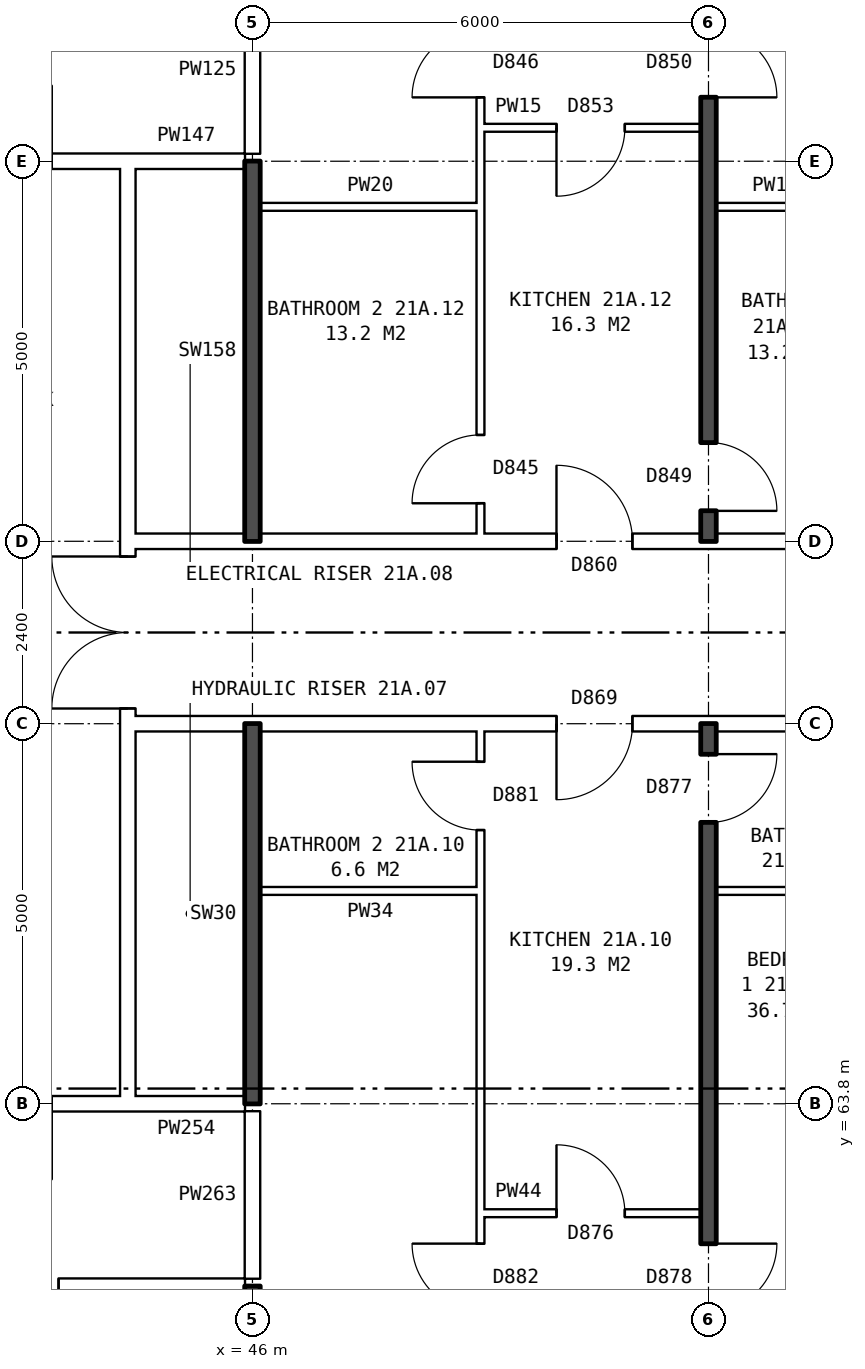
"""IFC4 building model, lengths in metres.
Left out: names, types, materials, properties, quantities, classifications, styles, units other than length and angle.
Written with IfcOpenShell. Run it as: python <this file> out.ifc"""

import sys

from ifc_helpers import new_model, si_unit, direction, frame, frame_2d, origin, place, context, subcontext, project, spatial, rectangle, extrude, element, fill, save


model = new_model("IFC4")
c1 = context("Model", 3, precision=1e-05, world=origin(), true_north=direction((0.0, 1.0)))
c2 = subcontext(c1, "Body", "Model", "MODEL_VIEW")
j1 = project(units=[si_unit("LENGTHUNIT", "METRE"), si_unit("PLANEANGLEUNIT", "RADIAN")], contexts=[c1])
p1 = place(None, origin())
s1 = spatial("IfcSite", under=j1, at=p1, CompositionType="ELEMENT")
p2 = place(p1, origin())
s2 = spatial("IfcBuilding", under=s1, at=p2, CompositionType="ELEMENT")
p3 = place(p2, frame((0.0, 0.0, 77.8)))
s3 = spatial("IfcBuildingStorey", under=s2, at=p3, CompositionType="ELEMENT", Elevation=77.8)
p4 = place(p3, frame((44.36, 63.9, 0.0), z_axis=(0.0, 0.0, 1.0), x_axis=(0.0, 1.0, 0.0)))
e1 = element("IfcWall", 1, at=p4, inside=s3, PredefinedType="PARTITIONING", context=c2, shape_type="SweptSolid", body=[
    extrude(rectangle(XDim=12.2, YDim=0.2, at=frame_2d((6.1, 0.0))), origin(), (0.0, 0.0, 1.0), 2.85),
])
p5 = place(p4, frame((5.1, 0.0, 0.0)))
e2 = element("IfcOpeningElement", 2, at=p5, cuts=e1, PredefinedType="OPENING", context=c2, shape_type="SweptSolid", body=[
    extrude(rectangle(XDim=2.0, YDim=2.1, at=frame_2d((1.0, 1.05))), frame((0.0, 0.11, 0.0), z_axis=(0.0, -1.0, 0.0), x_axis=(1.0, 0.0, 0.0)), (0.0, 0.0, 1.0), 0.22),
])
p6 = place(p3, frame((23.61, 61.4, 0.0), z_axis=(0.0, 0.0, 1.0), x_axis=(1.0, 0.0, 0.0)))
e3 = element("IfcWall", 3, at=p6, inside=s3, PredefinedType="PARTITIONING", context=c2, shape_type="SweptSolid", body=[
    extrude(rectangle(XDim=22.29, YDim=0.2, at=frame_2d((11.145, 0.0))), origin(), (0.0, 0.0, 1.0), 2.85),
])
p7 = place(p6, frame((18.84, 0.0, 0.0)))
e4 = element("IfcOpeningElement", 4, at=p7, cuts=e3, PredefinedType="OPENING", context=c2, shape_type="SweptSolid", body=[
    extrude(rectangle(XDim=1.0, YDim=2.1, at=frame_2d((0.5, 1.05))), frame((0.0, 0.11, 0.0), z_axis=(0.0, -1.0, 0.0), x_axis=(1.0, 0.0, 0.0)), (0.0, 0.0, 1.0), 0.22),
])
p8 = place(p6, frame((6.89, 0.0, 0.0)))
e5 = element("IfcOpeningElement", 5, at=p8, cuts=e3, PredefinedType="OPENING", context=c2, shape_type="SweptSolid", body=[
    extrude(rectangle(XDim=1.0, YDim=2.1, at=frame_2d((0.5, 1.05))), frame((0.0, 0.11, 0.0), z_axis=(0.0, -1.0, 0.0), x_axis=(1.0, 0.0, 0.0)), (0.0, 0.0, 1.0), 0.22),
])
p9 = place(p3, frame((49.0, 62.36, 0.0), z_axis=(0.0, 0.0, 1.0), x_axis=(1.0, 0.0, 0.0)))
e6 = element("IfcWall", 6, at=p9, inside=s3, PredefinedType="PARTITIONING", context=c2, shape_type="SweptSolid", body=[
    extrude(rectangle(XDim=2.9, YDim=0.1, at=frame_2d((1.45, 0.0))), origin(), (0.0, 0.0, 1.0), 2.85),
])
p10 = place(p9, frame((1.0, 0.0, 0.0)))
e7 = element("IfcOpeningElement", 7, at=p10, cuts=e6, PredefinedType="OPENING", context=c2, shape_type="SweptSolid", body=[
    extrude(rectangle(XDim=0.9, YDim=2.1, at=frame_2d((0.45, 1.05))), frame((0.0, 0.06, 0.0), z_axis=(0.0, -1.0, 0.0), x_axis=(1.0, 0.0, 0.0)), (0.0, 0.0, 1.0), 0.12),
])
p11 = place(p3, frame((41.36, 63.8, 0.0), z_axis=(0.0, 0.0, 1.0), x_axis=(1.0, 0.0, 0.0)))
e8 = element("IfcWall", 8, at=p11, inside=s3, PredefinedType="PARTITIONING", context=c2, shape_type="SweptSolid", body=[
    extrude(rectangle(XDim=3.0, YDim=0.2, at=frame_2d((1.5, 0.0))), origin(), (0.0, 0.0, 1.0), 2.85),
])
p12 = place(p11, frame((1.0, 0.0, 0.0)))
e9 = element("IfcOpeningElement", 9, at=p12, cuts=e8, PredefinedType="OPENING", context=c2, shape_type="SweptSolid", body=[
    extrude(rectangle(XDim=1.0, YDim=2.1, at=frame_2d((0.5, 1.05))), frame((0.0, 0.11, 0.0), z_axis=(0.0, -1.0, 0.0), x_axis=(1.0, 0.0, 0.0)), (0.0, 0.0, 1.0), 0.22),
])
p13 = place(p3, frame((44.36, 63.8, 0.0), z_axis=(0.0, 0.0, 1.0), x_axis=(1.0, 0.0, 0.0)))
e10 = element("IfcWall", 10, at=p13, inside=s3, PredefinedType="PARTITIONING", context=c2, shape_type="SweptSolid", body=[
    extrude(rectangle(XDim=1.54, YDim=0.2, at=frame_2d((0.77, 0.0))), origin(), (0.0, 0.0, 1.0), 2.85),
])
p14 = place(p3, frame((46.1, 66.6, 0.0), z_axis=(0.0, 0.0, 1.0), x_axis=(1.0, 0.0, 0.0)))
e11 = element("IfcWall", 11, at=p14, inside=s3, PredefinedType="PARTITIONING", context=c2, shape_type="SweptSolid", body=[
    extrude(rectangle(XDim=2.9, YDim=0.1, at=frame_2d((1.45, 0.0))), origin(), (0.0, 0.0, 1.0), 2.85),
])
p15 = place(p3, frame((52.1, 66.6, 0.0), z_axis=(0.0, 0.0, 1.0), x_axis=(1.0, 0.0, 0.0)))
e12 = element("IfcWall", 12, at=p15, inside=s3, PredefinedType="PARTITIONING", context=c2, shape_type="SweptSolid", body=[
    extrude(rectangle(XDim=2.8, YDim=0.1, at=frame_2d((1.4, 0.0))), origin(), (0.0, 0.0, 1.0), 2.85),
])
p16 = place(p3, frame((44.36, 68.8, 0.0), z_axis=(0.0, 0.0, 1.0), x_axis=(1.0, 0.0, 0.0)))
e13 = element("IfcWall", 13, at=p16, inside=s3, PredefinedType="PARTITIONING", context=c2, shape_type="SweptSolid", body=[
    extrude(rectangle(XDim=19.28, YDim=0.2, at=frame_2d((9.64, 0.0))), origin(), (0.0, 0.0, 1.0), 2.85),
])
p17 = place(p16, frame((14.64, 0.0, 0.0)))
e14 = element("IfcOpeningElement", 14, at=p17, cuts=e13, PredefinedType="OPENING", context=c2, shape_type="SweptSolid", body=[
    extrude(rectangle(XDim=1.0, YDim=2.1, at=frame_2d((0.5, 1.05))), frame((0.0, 0.11, 0.0), z_axis=(0.0, -1.0, 0.0), x_axis=(1.0, 0.0, 0.0)), (0.0, 0.0, 1.0), 0.22),
])
p18 = place(p16, frame((5.64, 0.0, 0.0)))
e15 = element("IfcOpeningElement", 15, at=p18, cuts=e13, PredefinedType="OPENING", context=c2, shape_type="SweptSolid", body=[
    extrude(rectangle(XDim=1.0, YDim=2.1, at=frame_2d((0.5, 1.05))), frame((0.0, 0.11, 0.0), z_axis=(0.0, -1.0, 0.0), x_axis=(1.0, 0.0, 0.0)), (0.0, 0.0, 1.0), 0.22),
])
p19 = place(p3, frame((44.36, 71.2, 0.0), z_axis=(0.0, 0.0, 1.0), x_axis=(1.0, 0.0, 0.0)))
e16 = element("IfcWall", 16, at=p19, inside=s3, PredefinedType="PARTITIONING", context=c2, shape_type="SweptSolid", body=[
    extrude(rectangle(XDim=19.28, YDim=0.2, at=frame_2d((9.64, 0.0))), origin(), (0.0, 0.0, 1.0), 2.85),
])
p20 = place(p19, frame((14.64, 0.0, 0.0)))
e17 = element("IfcOpeningElement", 17, at=p20, cuts=e16, PredefinedType="OPENING", context=c2, shape_type="SweptSolid", body=[
    extrude(rectangle(XDim=1.0, YDim=2.1, at=frame_2d((0.5, 1.05))), frame((0.0, 0.11, 0.0), z_axis=(0.0, -1.0, 0.0), x_axis=(1.0, 0.0, 0.0)), (0.0, 0.0, 1.0), 0.22),
])
p21 = place(p19, frame((5.64, 0.0, 0.0)))
e18 = element("IfcOpeningElement", 18, at=p21, cuts=e16, PredefinedType="OPENING", context=c2, shape_type="SweptSolid", body=[
    extrude(rectangle(XDim=1.0, YDim=2.1, at=frame_2d((0.5, 1.05))), frame((0.0, 0.11, 0.0), z_axis=(0.0, -1.0, 0.0), x_axis=(1.0, 0.0, 0.0)), (0.0, 0.0, 1.0), 0.22),
])
p22 = place(p3, frame((46.1, 75.6, 0.0), z_axis=(0.0, 0.0, 1.0), x_axis=(1.0, 0.0, 0.0)))
e19 = element("IfcWall", 19, at=p22, inside=s3, PredefinedType="PARTITIONING", context=c2, shape_type="SweptSolid", body=[
    extrude(rectangle(XDim=2.9, YDim=0.1, at=frame_2d((1.45, 0.0))), origin(), (0.0, 0.0, 1.0), 2.85),
])
p23 = place(p3, frame((52.1, 75.6, 0.0), z_axis=(0.0, 0.0, 1.0), x_axis=(1.0, 0.0, 0.0)))
e20 = element("IfcWall", 20, at=p23, inside=s3, PredefinedType="PARTITIONING", context=c2, shape_type="SweptSolid", body=[
    extrude(rectangle(XDim=2.8, YDim=0.1, at=frame_2d((1.4, 0.0))), origin(), (0.0, 0.0, 1.0), 2.85),
])
p24 = place(p3, frame((41.36, 76.2, 0.0), z_axis=(0.0, 0.0, 1.0), x_axis=(1.0, 0.0, 0.0)))
e21 = element("IfcWall", 21, at=p24, inside=s3, PredefinedType="PARTITIONING", context=c2, shape_type="SweptSolid", body=[
    extrude(rectangle(XDim=3.0, YDim=0.2, at=frame_2d((1.5, 0.0))), origin(), (0.0, 0.0, 1.0), 2.85),
])
p25 = place(p24, frame((1.0, 0.0, 0.0)))
e22 = element("IfcOpeningElement", 22, at=p25, cuts=e21, PredefinedType="OPENING", context=c2, shape_type="SweptSolid", body=[
    extrude(rectangle(XDim=1.0, YDim=2.1, at=frame_2d((0.5, 1.05))), frame((0.0, 0.11, 0.0), z_axis=(0.0, -1.0, 0.0), x_axis=(1.0, 0.0, 0.0)), (0.0, 0.0, 1.0), 0.22),
])
p26 = place(p3, frame((44.36, 76.2, 0.0), z_axis=(0.0, 0.0, 1.0), x_axis=(1.0, 0.0, 0.0)))
e23 = element("IfcWall", 23, at=p26, inside=s3, PredefinedType="PARTITIONING", context=c2, shape_type="SweptSolid", body=[
    extrude(rectangle(XDim=1.54, YDim=0.2, at=frame_2d((0.77, 0.0))), origin(), (0.0, 0.0, 1.0), 2.85),
])
p27 = place(p3, frame((49.0, 76.64, 0.0), z_axis=(0.0, 0.0, 1.0), x_axis=(1.0, 0.0, 0.0)))
e24 = element("IfcWall", 24, at=p27, inside=s3, PredefinedType="PARTITIONING", context=c2, shape_type="SweptSolid", body=[
    extrude(rectangle(XDim=2.9, YDim=0.1, at=frame_2d((1.45, 0.0))), origin(), (0.0, 0.0, 1.0), 2.85),
])
p28 = place(p27, frame((1.0, 0.0, 0.0)))
e25 = element("IfcOpeningElement", 25, at=p28, cuts=e24, PredefinedType="OPENING", context=c2, shape_type="SweptSolid", body=[
    extrude(rectangle(XDim=0.9, YDim=2.1, at=frame_2d((0.45, 1.05))), frame((0.0, 0.06, 0.0), z_axis=(0.0, -1.0, 0.0), x_axis=(1.0, 0.0, 0.0)), (0.0, 0.0, 1.0), 0.12),
])
p29 = place(p3, frame((46.0, 54.36, 0.0), z_axis=(0.0, 0.0, 1.0), x_axis=(0.0, 1.0, 0.0)))
e26 = element("IfcWall", 26, at=p29, inside=s3, PredefinedType="SOLIDWALL", context=c2, shape_type="SweptSolid", body=[
    extrude(rectangle(XDim=7.04, YDim=0.2, at=frame_2d((3.52, 0.0))), origin(), (0.0, 0.0, 1.0), 2.85),
])
p30 = place(p3, frame((46.0, 61.5, 0.0), z_axis=(0.0, 0.0, 1.0), x_axis=(0.0, 1.0, 0.0)))
e27 = element("IfcWall", 27, at=p30, inside=s3, PredefinedType="PARTITIONING", context=c2, shape_type="SweptSolid", body=[
    extrude(rectangle(XDim=2.2, YDim=0.2, at=frame_2d((1.1, 0.0))), origin(), (0.0, 0.0, 1.0), 2.85),
])
for number, where, z_axis, x_axis in (
    (28, (46.0, 63.8, 0.0), (0.0, 0.0, 1.0), (0.0, 1.0, 0.0)),
    (29, (46.0, 71.2, 0.0), (0.0, 0.0, 1.0), (0.0, 1.0, 0.0)),
):
    element("IfcWall", number, at=place(p3, frame(where, z_axis=z_axis, x_axis=x_axis)), inside=s3, PredefinedType="SOLIDWALL", context=c2, shape_type="SweptSolid", body=[
        extrude(rectangle(XDim=5.0, YDim=0.2, at=frame_2d((2.5, 0.0))), origin(), (0.0, 0.0, 1.0), 2.85),
    ])
p31 = place(p3, frame((46.0, 76.3, 0.0), z_axis=(0.0, 0.0, 1.0), x_axis=(0.0, 1.0, 0.0)))
e30 = element("IfcWall", 30, at=p31, inside=s3, PredefinedType="PARTITIONING", context=c2, shape_type="SweptSolid", body=[
    extrude(rectangle(XDim=2.2, YDim=0.2, at=frame_2d((1.1, 0.0))), origin(), (0.0, 0.0, 1.0), 2.85),
])
p32 = place(p3, frame((49.0, 54.36, 0.0), z_axis=(0.0, 0.0, 1.0), x_axis=(0.0, 1.0, 0.0)))
e31 = element("IfcWall", 31, at=p32, inside=s3, PredefinedType="PARTITIONING", context=c2, shape_type="SweptSolid", body=[
    extrude(rectangle(XDim=14.34, YDim=0.1, at=frame_2d((7.17, 0.0))), origin(), (0.0, 0.0, 1.0), 2.85),
])
p33 = place(p32, frame((6.7, 0.0, 0.0)))
e32 = element("IfcOpeningElement", 32, at=p33, cuts=e31, PredefinedType="OPENING", context=c2, shape_type="SweptSolid", body=[
    extrude(rectangle(XDim=0.9, YDim=2.1, at=frame_2d((0.45, 1.05))), frame((0.0, 0.06, 0.0), z_axis=(0.0, -1.0, 0.0), x_axis=(1.0, 0.0, 0.0)), (0.0, 0.0, 1.0), 0.12),
])
p34 = place(p32, frame((13.04, 0.0, 0.0)))
e33 = element("IfcOpeningElement", 33, at=p34, cuts=e31, PredefinedType="OPENING", context=c2, shape_type="SweptSolid", body=[
    extrude(rectangle(XDim=0.9, YDim=2.1, at=frame_2d((0.45, 1.05))), frame((0.0, 0.06, 0.0), z_axis=(0.0, -1.0, 0.0), x_axis=(1.0, 0.0, 0.0)), (0.0, 0.0, 1.0), 0.12),
])
p35 = place(p3, frame((49.0, 71.3, 0.0), z_axis=(0.0, 0.0, 1.0), x_axis=(0.0, 1.0, 0.0)))
e34 = element("IfcWall", 34, at=p35, inside=s3, PredefinedType="PARTITIONING", context=c2, shape_type="SweptSolid", body=[
    extrude(rectangle(XDim=14.34, YDim=0.1, at=frame_2d((7.17, 0.0))), origin(), (0.0, 0.0, 1.0), 2.85),
])
p36 = place(p35, frame((5.74, 0.0, 0.0)))
e35 = element("IfcOpeningElement", 35, at=p36, cuts=e34, PredefinedType="OPENING", context=c2, shape_type="SweptSolid", body=[
    extrude(rectangle(XDim=0.9, YDim=2.1, at=frame_2d((0.45, 1.05))), frame((0.0, 0.06, 0.0), z_axis=(0.0, -1.0, 0.0), x_axis=(1.0, 0.0, 0.0)), (0.0, 0.0, 1.0), 0.12),
])
p37 = place(p35, frame((0.4, 0.0, 0.0)))
e36 = element("IfcOpeningElement", 36, at=p37, cuts=e34, PredefinedType="OPENING", context=c2, shape_type="SweptSolid", body=[
    extrude(rectangle(XDim=0.9, YDim=2.1, at=frame_2d((0.45, 1.05))), frame((0.0, 0.06, 0.0), z_axis=(0.0, -1.0, 0.0), x_axis=(1.0, 0.0, 0.0)), (0.0, 0.0, 1.0), 0.12),
])
p38 = place(p3, frame((52.0, 54.36, 0.0), z_axis=(0.0, 0.0, 1.0), x_axis=(0.0, 1.0, 0.0)))
e37 = element("IfcWall", 37, at=p38, inside=s3, PredefinedType="SOLIDWALL", context=c2, shape_type="SweptSolid", body=[
    extrude(rectangle(XDim=14.44, YDim=0.2, at=frame_2d((7.22, 0.0))), origin(), (0.0, 0.0, 1.0), 2.85),
])
p39 = place(p38, frame((6.7, 0.0, 0.0)))
e38 = element("IfcOpeningElement", 38, at=p39, cuts=e37, PredefinedType="OPENING", context=c2, shape_type="SweptSolid", body=[
    extrude(rectangle(XDim=0.9, YDim=2.1, at=frame_2d((0.45, 1.05))), frame((0.0, 0.11, 0.0), z_axis=(0.0, -1.0, 0.0), x_axis=(1.0, 0.0, 0.0)), (0.0, 0.0, 1.0), 0.22),
])
p40 = place(p38, frame((13.14, 0.0, 0.0)))
e39 = element("IfcOpeningElement", 39, at=p40, cuts=e37, PredefinedType="OPENING", context=c2, shape_type="SweptSolid", body=[
    extrude(rectangle(XDim=0.9, YDim=2.1, at=frame_2d((0.45, 1.05))), frame((0.0, 0.11, 0.0), z_axis=(0.0, -1.0, 0.0), x_axis=(1.0, 0.0, 0.0)), (0.0, 0.0, 1.0), 0.22),
])
p41 = place(p3, frame((52.0, 71.2, 0.0), z_axis=(0.0, 0.0, 1.0), x_axis=(0.0, 1.0, 0.0)))
e40 = element("IfcWall", 40, at=p41, inside=s3, PredefinedType="SOLIDWALL", context=c2, shape_type="SweptSolid", body=[
    extrude(rectangle(XDim=14.44, YDim=0.2, at=frame_2d((7.22, 0.0))), origin(), (0.0, 0.0, 1.0), 2.85),
])
p42 = place(p41, frame((5.84, 0.0, 0.0)))
e41 = element("IfcOpeningElement", 41, at=p42, cuts=e40, PredefinedType="OPENING", context=c2, shape_type="SweptSolid", body=[
    extrude(rectangle(XDim=0.9, YDim=2.1, at=frame_2d((0.45, 1.05))), frame((0.0, 0.11, 0.0), z_axis=(0.0, -1.0, 0.0), x_axis=(1.0, 0.0, 0.0)), (0.0, 0.0, 1.0), 0.22),
])
p43 = place(p41, frame((0.4, 0.0, 0.0)))
e42 = element("IfcOpeningElement", 42, at=p43, cuts=e40, PredefinedType="OPENING", context=c2, shape_type="SweptSolid", body=[
    extrude(rectangle(XDim=0.9, YDim=2.1, at=frame_2d((0.45, 1.05))), frame((0.0, 0.11, 0.0), z_axis=(0.0, -1.0, 0.0), x_axis=(1.0, 0.0, 0.0)), (0.0, 0.0, 1.0), 0.22),
])
p44 = place(p5, origin())
e43 = element("IfcDoor", 43, at=p44, inside=s3, OperationType="DOUBLE_DOOR_SINGLE_SWING", PredefinedType="DOOR", context=c2, shape_type="SweptSolid", body=[
    extrude(rectangle(XDim=2.0, YDim=2.1, at=frame_2d((1.0, 1.05))), frame((0.0, 0.025, 0.0), z_axis=(0.0, -1.0, 0.0), x_axis=(1.0, 0.0, 0.0)), (0.0, 0.0, 1.0), 0.05),
])
fill(e2, e43)
p45 = place(p39, frame((0.9, 0.0, 0.0), z_axis=(0.0, 0.0, 1.0), x_axis=(-1.0, 0.0, 0.0)))
e44 = element("IfcDoor", 44, at=p45, inside=s3, OperationType="SINGLE_SWING_LEFT", PredefinedType="DOOR", context=c2, shape_type="SweptSolid", body=[
    extrude(rectangle(XDim=0.9, YDim=2.1, at=frame_2d((0.45, 1.05))), frame((0.0, 0.025, 0.0), z_axis=(0.0, -1.0, 0.0), x_axis=(1.0, 0.0, 0.0)), (0.0, 0.0, 1.0), 0.05),
])
fill(e38, e44)
p46 = place(p33, origin())
e45 = element("IfcDoor", 45, at=p46, inside=s3, OperationType="SINGLE_SWING_RIGHT", PredefinedType="DOOR", context=c2, shape_type="SweptSolid", body=[
    extrude(rectangle(XDim=0.9, YDim=2.1, at=frame_2d((0.45, 1.05))), frame((0.0, 0.025, 0.0), z_axis=(0.0, -1.0, 0.0), x_axis=(1.0, 0.0, 0.0)), (0.0, 0.0, 1.0), 0.05),
])
fill(e32, e45)
p47 = place(p18, frame((1.0, 0.0, 0.0), z_axis=(0.0, 0.0, 1.0), x_axis=(-1.0, 0.0, 0.0)))
e46 = element("IfcDoor", 46, at=p47, inside=s3, OperationType="SINGLE_SWING_RIGHT", PredefinedType="DOOR", context=c2, shape_type="SweptSolid", body=[
    extrude(rectangle(XDim=1.0, YDim=2.1, at=frame_2d((0.5, 1.05))), frame((0.0, 0.025, 0.0), z_axis=(0.0, -1.0, 0.0), x_axis=(1.0, 0.0, 0.0)), (0.0, 0.0, 1.0), 0.05),
])
fill(e15, e46)
p48 = place(p10, origin())
e47 = element("IfcDoor", 47, at=p48, inside=s3, OperationType="SINGLE_SWING_LEFT", PredefinedType="DOOR", context=c2, shape_type="SweptSolid", body=[
    extrude(rectangle(XDim=0.9, YDim=2.1, at=frame_2d((0.45, 1.05))), frame((0.0, 0.025, 0.0), z_axis=(0.0, -1.0, 0.0), x_axis=(1.0, 0.0, 0.0)), (0.0, 0.0, 1.0), 0.05),
])
fill(e7, e47)
p49 = place(p40, frame((0.9, 0.0, 0.0), z_axis=(0.0, 0.0, 1.0), x_axis=(-1.0, 0.0, 0.0)))
e48 = element("IfcDoor", 48, at=p49, inside=s3, OperationType="SINGLE_SWING_LEFT", PredefinedType="DOOR", context=c2, shape_type="SweptSolid", body=[
    extrude(rectangle(XDim=0.9, YDim=2.1, at=frame_2d((0.45, 1.05))), frame((0.0, 0.025, 0.0), z_axis=(0.0, -1.0, 0.0), x_axis=(1.0, 0.0, 0.0)), (0.0, 0.0, 1.0), 0.05),
])
fill(e39, e48)
p50 = place(p34, origin())
e49 = element("IfcDoor", 49, at=p50, inside=s3, OperationType="SINGLE_SWING_RIGHT", PredefinedType="DOOR", context=c2, shape_type="SweptSolid", body=[
    extrude(rectangle(XDim=0.9, YDim=2.1, at=frame_2d((0.45, 1.05))), frame((0.0, 0.025, 0.0), z_axis=(0.0, -1.0, 0.0), x_axis=(1.0, 0.0, 0.0)), (0.0, 0.0, 1.0), 0.05),
])
fill(e33, e49)
p51 = place(p42, frame((0.9, 0.0, 0.0), z_axis=(0.0, 0.0, 1.0), x_axis=(-1.0, 0.0, 0.0)))
e50 = element("IfcDoor", 50, at=p51, inside=s3, OperationType="SINGLE_SWING_RIGHT", PredefinedType="DOOR", context=c2, shape_type="SweptSolid", body=[
    extrude(rectangle(XDim=0.9, YDim=2.1, at=frame_2d((0.45, 1.05))), frame((0.0, 0.025, 0.0), z_axis=(0.0, -1.0, 0.0), x_axis=(1.0, 0.0, 0.0)), (0.0, 0.0, 1.0), 0.05),
])
fill(e41, e50)
p52 = place(p36, origin())
e51 = element("IfcDoor", 51, at=p52, inside=s3, OperationType="SINGLE_SWING_LEFT", PredefinedType="DOOR", context=c2, shape_type="SweptSolid", body=[
    extrude(rectangle(XDim=0.9, YDim=2.1, at=frame_2d((0.45, 1.05))), frame((0.0, 0.025, 0.0), z_axis=(0.0, -1.0, 0.0), x_axis=(1.0, 0.0, 0.0)), (0.0, 0.0, 1.0), 0.05),
])
fill(e35, e51)
p53 = place(p21, origin())
e52 = element("IfcDoor", 52, at=p53, inside=s3, OperationType="SINGLE_SWING_LEFT", PredefinedType="DOOR", context=c2, shape_type="SweptSolid", body=[
    extrude(rectangle(XDim=1.0, YDim=2.1, at=frame_2d((0.5, 1.05))), frame((0.0, 0.025, 0.0), z_axis=(0.0, -1.0, 0.0), x_axis=(1.0, 0.0, 0.0)), (0.0, 0.0, 1.0), 0.05),
])
fill(e18, e52)
p54 = place(p28, frame((0.9, 0.0, 0.0), z_axis=(0.0, 0.0, 1.0), x_axis=(-1.0, 0.0, 0.0)))
e53 = element("IfcDoor", 53, at=p54, inside=s3, OperationType="SINGLE_SWING_RIGHT", PredefinedType="DOOR", context=c2, shape_type="SweptSolid", body=[
    extrude(rectangle(XDim=0.9, YDim=2.1, at=frame_2d((0.45, 1.05))), frame((0.0, 0.025, 0.0), z_axis=(0.0, -1.0, 0.0), x_axis=(1.0, 0.0, 0.0)), (0.0, 0.0, 1.0), 0.05),
])
fill(e25, e53)
p55 = place(p43, frame((0.9, 0.0, 0.0), z_axis=(0.0, 0.0, 1.0), x_axis=(-1.0, 0.0, 0.0)))
e54 = element("IfcDoor", 54, at=p55, inside=s3, OperationType="SINGLE_SWING_RIGHT", PredefinedType="DOOR", context=c2, shape_type="SweptSolid", body=[
    extrude(rectangle(XDim=0.9, YDim=2.1, at=frame_2d((0.45, 1.05))), frame((0.0, 0.025, 0.0), z_axis=(0.0, -1.0, 0.0), x_axis=(1.0, 0.0, 0.0)), (0.0, 0.0, 1.0), 0.05),
])
fill(e42, e54)
p56 = place(p37, origin())
e55 = element("IfcDoor", 55, at=p56, inside=s3, OperationType="SINGLE_SWING_LEFT", PredefinedType="DOOR", context=c2, shape_type="SweptSolid", body=[
    extrude(rectangle(XDim=0.9, YDim=2.1, at=frame_2d((0.45, 1.05))), frame((0.0, 0.025, 0.0), z_axis=(0.0, -1.0, 0.0), x_axis=(1.0, 0.0, 0.0)), (0.0, 0.0, 1.0), 0.05),
])
fill(e36, e55)
p57 = place(p7, frame((1.0, 0.0, 0.0), z_axis=(0.0, 0.0, 1.0), x_axis=(-1.0, 0.0, 0.0)))
e56 = element("IfcDoor", 56, at=p57, inside=s3, OperationType="SINGLE_SWING_RIGHT", PredefinedType="DOOR", context=c2, shape_type="SweptSolid", body=[
    extrude(rectangle(XDim=1.0, YDim=2.1, at=frame_2d((0.5, 1.05))), frame((0.0, 0.025, 0.0), z_axis=(0.0, -1.0, 0.0), x_axis=(1.0, 0.0, 0.0)), (0.0, 0.0, 1.0), 0.05),
])
fill(e4, e56)
save(model, sys.argv[1])
